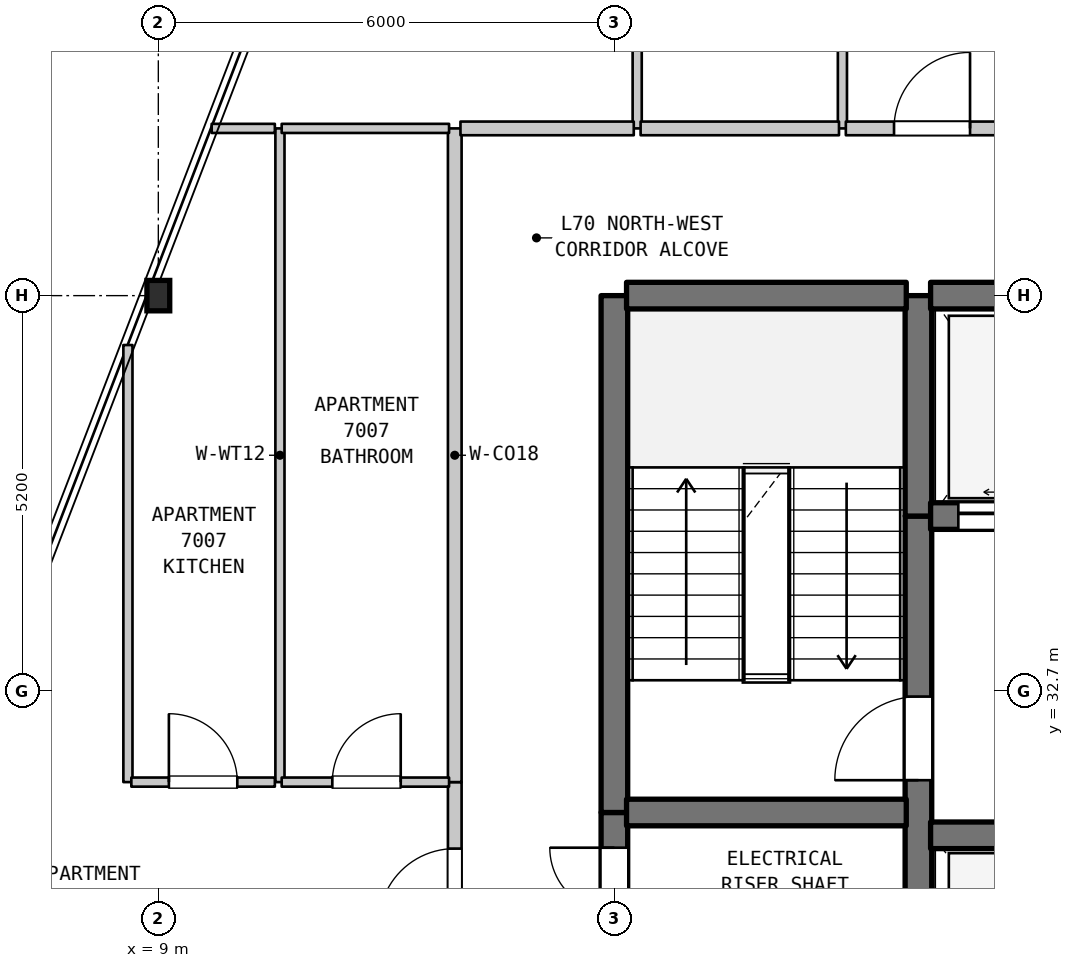
"""IFC4 building model, lengths in metres.
Left out: names, types, materials, properties, quantities, classifications, styles, units other than length and angle.
Written with IfcOpenShell. Run it as: python <this file> out.ifc"""

import sys

from ifc_helpers import new_model, si_unit, direction, frame, frame_2d, origin, origin_2d, place, context, subcontext, project, spatial, rectangle, i_section, extrude, element, fill, save


model = new_model("IFC4")
c1 = context("Model", 3, precision=1e-05, world=origin(), true_north=direction((0.0, 1.0)))
c2 = subcontext(c1, "Body", "Model", "MODEL_VIEW")
j1 = project(units=[si_unit("LENGTHUNIT", "METRE"), si_unit("PLANEANGLEUNIT", "RADIAN")], contexts=[c1])
p1 = place(None, origin())
s1 = spatial("IfcSite", under=j1, at=p1, CompositionType="ELEMENT")
p2 = place(p1, origin())
s2 = spatial("IfcBuilding", under=s1, at=p2, CompositionType="ELEMENT")
p3 = place(p2, frame((0.0, 0.0, 280.6)))
s3 = spatial("IfcBuildingStorey", under=s2, at=p3, CompositionType="ELEMENT", Elevation=280.6)
p4 = place(p3, frame((9.0, 37.9, 0.0), z_axis=(0.0, 0.0, 1.0), x_axis=(1.0, 0.0, 0.0)))
e1 = element("IfcColumn", 1, at=p4, inside=s3, PredefinedType="COLUMN", context=c2, shape_type="SweptSolid", body=[
    extrude(i_section(OverallWidth=0.3, OverallDepth=0.4, WebThickness=0.013, FlangeThickness=0.024, FilletRadius=0.027, at=origin_2d()), origin(), (0.0, 0.0, 1.0), 3.7),
])
p5 = place(p3, frame((8.6, 31.5, 0.0), z_axis=(0.0, 0.0, 1.0), x_axis=(0.0, 1.0, 0.0)))
e2 = element("IfcWall", 2, at=p5, inside=s3, PredefinedType="PARTITIONING", context=c2, shape_type="SweptSolid", body=[
    extrude(rectangle(XDim=5.75, YDim=0.12, at=frame_2d((2.875, 0.0))), origin(), (0.0, 0.0, 1.0), 3.39),
])
p6 = place(p3, frame((10.6, 31.5, 0.0), z_axis=(0.0, 0.0, 1.0), x_axis=(0.0, 1.0, 0.0)))
e3 = element("IfcWall", 3, at=p6, inside=s3, PredefinedType="PARTITIONING", context=c2, shape_type="SweptSolid", body=[
    extrude(rectangle(XDim=8.6, YDim=0.12, at=frame_2d((4.3, 0.0))), origin(), (0.0, 0.0, 1.0), 3.39),
])
p7 = place(p3, frame((12.9, 28.75, 0.0), z_axis=(0.0, 0.0, 1.0), x_axis=(0.0, 1.0, 0.0)))
e4 = element("IfcWall", 4, at=p7, inside=s3, PredefinedType="STANDARD", context=c2, shape_type="SweptSolid", body=[
    extrude(rectangle(XDim=2.75, YDim=0.18, at=frame_2d((1.375, 0.0))), origin(), (0.0, 0.0, 1.0), 3.39),
])
p8 = place(p7, frame((0.875, 0.0, 0.0)))
e5 = element("IfcOpeningElement", 5, at=p8, cuts=e4, PredefinedType="OPENING", context=c2, shape_type="SweptSolid", body=[
    extrude(rectangle(XDim=1.0, YDim=2.15, at=frame_2d((0.5, 1.075))), frame((0.0, 0.1, 0.0), z_axis=(0.0, -1.0, 0.0), x_axis=(1.0, 0.0, 0.0)), (0.0, 0.0, 1.0), 0.2),
])
p9 = place(p3, frame((12.9, 31.5, 0.0), z_axis=(0.0, 0.0, 1.0), x_axis=(0.0, 1.0, 0.0)))
e6 = element("IfcWall", 6, at=p9, inside=s3, PredefinedType="STANDARD", context=c2, shape_type="SweptSolid", body=[
    extrude(rectangle(XDim=8.6, YDim=0.18, at=frame_2d((4.3, 0.0))), origin(), (0.0, 0.0, 1.0), 3.39),
])
p10 = place(p3, frame((15.0, 29.5, 0.0), z_axis=(0.0, 0.0, 1.0), x_axis=(0.0, 1.0, 0.0)))
e7 = element("IfcWall", 7, at=p10, inside=s3, PredefinedType="SHEAR", context=c2, shape_type="SweptSolid", body=[
    extrude(rectangle(XDim=1.6, YDim=0.35, at=frame_2d((0.8, 0.0))), origin(), (0.0, 0.0, 1.0), 3.39),
])
p11 = place(p10, frame((0.287, 0.0, 0.0)))
e8 = element("IfcOpeningElement", 8, at=p11, cuts=e7, PredefinedType="OPENING", context=c2, shape_type="SweptSolid", body=[
    extrude(rectangle(XDim=0.85, YDim=2.1, at=frame_2d((0.425, 1.05))), frame((0.0, 0.185, 0.0), z_axis=(0.0, -1.0, 0.0), x_axis=(1.0, 0.0, 0.0)), (0.0, 0.0, 1.0), 0.37),
])
p12 = place(p3, frame((15.0, 31.1, 0.0), z_axis=(0.0, 0.0, 1.0), x_axis=(0.0, 1.0, 0.0)))
e9 = element("IfcWall", 9, at=p12, inside=s3, PredefinedType="SHEAR", context=c2, shape_type="SweptSolid", body=[
    extrude(rectangle(XDim=6.8, YDim=0.35, at=frame_2d((3.4, 0.0))), origin(), (0.0, 0.0, 1.0), 3.39),
])
p13 = place(p3, frame((15.3, 40.1, 0.0), z_axis=(0.0, 0.0, 1.0), x_axis=(0.0, 1.0, 0.0)))
e10 = element("IfcWall", 10, at=p13, inside=s3, PredefinedType="PARTITIONING", context=c2, shape_type="SweptSolid", body=[
    extrude(rectangle(XDim=3.2, YDim=0.12, at=frame_2d((1.6, 0.0))), origin(), (0.0, 0.0, 1.0), 3.39),
])
p14 = place(p3, frame((18.0, 40.1, 0.0), z_axis=(0.0, 0.0, 1.0), x_axis=(0.0, 1.0, 0.0)))
e11 = element("IfcWall", 11, at=p14, inside=s3, PredefinedType="PARTITIONING", context=c2, shape_type="SweptSolid", body=[
    extrude(rectangle(XDim=3.2, YDim=0.12, at=frame_2d((1.6, 0.0))), origin(), (0.0, 0.0, 1.0), 3.39),
])
p15 = place(p14, frame((1.15, 0.0, 0.0)))
e12 = element("IfcOpeningElement", 12, at=p15, cuts=e11, PredefinedType="OPENING", context=c2, shape_type="SweptSolid", body=[
    extrude(rectangle(XDim=0.9, YDim=2.15, at=frame_2d((0.45, 1.075))), frame((0.0, 0.07, 0.0), z_axis=(0.0, -1.0, 0.0), x_axis=(1.0, 0.0, 0.0)), (0.0, 0.0, 1.0), 0.14),
])
p16 = place(p3, frame((19.0, 29.5, 0.0), z_axis=(0.0, 0.0, 1.0), x_axis=(0.0, 1.0, 0.0)))
e13 = element("IfcWall", 13, at=p16, inside=s3, PredefinedType="SHEAR", context=c2, shape_type="SweptSolid", body=[
    extrude(rectangle(XDim=5.5, YDim=0.35, at=frame_2d((2.75, 0.0))), origin(), (0.0, 0.0, 1.0), 3.39),
])
p17 = place(p16, frame((2.025, 0.0, 0.0)))
e14 = element("IfcOpeningElement", 14, at=p17, cuts=e13, PredefinedType="OPENING", context=c2, shape_type="SweptSolid", body=[
    extrude(rectangle(XDim=1.1, YDim=2.15, at=frame_2d((0.55, 1.075))), frame((0.0, 0.185, 0.0), z_axis=(0.0, -1.0, 0.0), x_axis=(1.0, 0.0, 0.0)), (0.0, 0.0, 1.0), 0.37),
])
p18 = place(p3, frame((19.0, 35.0, 0.0), z_axis=(0.0, 0.0, 1.0), x_axis=(0.0, 1.0, 0.0)))
e15 = element("IfcWall", 15, at=p18, inside=s3, PredefinedType="SHEAR", context=c2, shape_type="SweptSolid", body=[
    extrude(rectangle(XDim=2.9, YDim=0.35, at=frame_2d((1.45, 0.0))), origin(), (0.0, 0.0, 1.0), 3.39),
])
p19 = place(p3, frame((19.16, 30.8, 0.0), z_axis=(0.0, 0.0, 1.0), x_axis=(1.0, 0.0, 0.0)))
e16 = element("IfcWall", 16, at=p19, inside=s3, PredefinedType="SHEAR", context=c2, shape_type="SweptSolid", body=[
    extrude(rectangle(XDim=4.48, YDim=0.35, at=frame_2d((2.24, 0.0))), origin(), (0.0, 0.0, 1.0), 3.39),
])
p20 = place(p3, frame((15.16, 31.1, 0.0), z_axis=(0.0, 0.0, 1.0), x_axis=(1.0, 0.0, 0.0)))
e17 = element("IfcWall", 17, at=p20, inside=s3, PredefinedType="SHEAR", context=c2, shape_type="SweptSolid", body=[
    extrude(rectangle(XDim=3.68, YDim=0.35, at=frame_2d((1.84, 0.0))), origin(), (0.0, 0.0, 1.0), 3.39),
])
p21 = place(p3, frame((8.645, 31.5, 0.0), z_axis=(0.0, 0.0, 1.0), x_axis=(1.0, 0.0, 0.0)))
e18 = element("IfcWall", 18, at=p21, inside=s3, PredefinedType="PARTITIONING", context=c2, shape_type="SweptSolid", body=[
    extrude(rectangle(XDim=1.888, YDim=0.12, at=frame_2d((0.944, 0.0))), origin(), (0.0, 0.0, 1.0), 3.39),
])
p22 = place(p21, frame((0.494, 0.0, 0.0)))
e19 = element("IfcOpeningElement", 19, at=p22, cuts=e18, PredefinedType="OPENING", context=c2, shape_type="SweptSolid", body=[
    extrude(rectangle(XDim=0.9, YDim=2.15, at=frame_2d((0.45, 1.075))), frame((0.0, 0.07, 0.0), z_axis=(0.0, -1.0, 0.0), x_axis=(1.0, 0.0, 0.0)), (0.0, 0.0, 1.0), 0.14),
])
p23 = place(p3, frame((10.623, 31.5, 0.0), z_axis=(0.0, 0.0, 1.0), x_axis=(1.0, 0.0, 0.0)))
e20 = element("IfcWall", 20, at=p23, inside=s3, PredefinedType="PARTITIONING", context=c2, shape_type="SweptSolid", body=[
    extrude(rectangle(XDim=2.202, YDim=0.12, at=frame_2d((1.101, 0.0))), origin(), (0.0, 0.0, 1.0), 3.39),
])
p24 = place(p23, frame((0.666, 0.0, 0.0)))
e21 = element("IfcOpeningElement", 21, at=p24, cuts=e20, PredefinedType="OPENING", context=c2, shape_type="SweptSolid", body=[
    extrude(rectangle(XDim=0.9, YDim=2.1, at=frame_2d((0.45, 1.05))), frame((0.0, 0.07, 0.0), z_axis=(0.0, -1.0, 0.0), x_axis=(1.0, 0.0, 0.0)), (0.0, 0.0, 1.0), 0.14),
])
p25 = place(p3, frame((19.16, 35.0, 0.0), z_axis=(0.0, 0.0, 1.0), x_axis=(1.0, 0.0, 0.0)))
e22 = element("IfcWall", 22, at=p25, inside=s3, PredefinedType="SHEAR", context=c2, shape_type="SweptSolid", body=[
    extrude(rectangle(XDim=4.48, YDim=0.35, at=frame_2d((2.24, 0.0))), origin(), (0.0, 0.0, 1.0), 3.39),
])
p26 = place(p25, frame((0.365, 0.0, 0.0)))
e23 = element("IfcOpeningElement", 23, at=p26, cuts=e22, PredefinedType="OPENING", context=c2, shape_type="SweptSolid", body=[
    extrude(rectangle(XDim=1.35, YDim=2.2, at=frame_2d((0.675, 1.1))), frame((0.0, 0.185, 0.0), z_axis=(0.0, -1.0, 0.0), x_axis=(1.0, 0.0, 0.0)), (0.0, 0.0, 1.0), 0.37),
])
p27 = place(p25, frame((2.765, 0.0, 0.0)))
e24 = element("IfcOpeningElement", 24, at=p27, cuts=e22, PredefinedType="OPENING", context=c2, shape_type="SweptSolid", body=[
    extrude(rectangle(XDim=1.35, YDim=2.2, at=frame_2d((0.675, 1.1))), frame((0.0, 0.185, 0.0), z_axis=(0.0, -1.0, 0.0), x_axis=(1.0, 0.0, 0.0)), (0.0, 0.0, 1.0), 0.37),
])
p28 = place(p3, frame((15.16, 37.9, 0.0), z_axis=(0.0, 0.0, 1.0), x_axis=(1.0, 0.0, 0.0)))
e25 = element("IfcWall", 25, at=p28, inside=s3, PredefinedType="SHEAR", context=c2, shape_type="SweptSolid", body=[
    extrude(rectangle(XDim=3.68, YDim=0.35, at=frame_2d((1.84, 0.0))), origin(), (0.0, 0.0, 1.0), 3.39),
])
p29 = place(p3, frame((19.16, 37.9, 0.0), z_axis=(0.0, 0.0, 1.0), x_axis=(1.0, 0.0, 0.0)))
e26 = element("IfcWall", 26, at=p29, inside=s3, PredefinedType="SHEAR", context=c2, shape_type="SweptSolid", body=[
    extrude(rectangle(XDim=4.48, YDim=0.35, at=frame_2d((2.24, 0.0))), origin(), (0.0, 0.0, 1.0), 3.39),
])
p30 = place(p3, frame((9.702, 40.1, 0.0), z_axis=(0.0, 0.0, 1.0), x_axis=(1.0, 0.0, 0.0)))
e27 = element("IfcWall", 27, at=p30, inside=s3, PredefinedType="PARTITIONING", context=c2, shape_type="SweptSolid", body=[
    extrude(rectangle(XDim=0.831, YDim=0.12, at=frame_2d((0.416, 0.0))), origin(), (0.0, 0.0, 1.0), 3.39),
])
p31 = place(p3, frame((10.623, 40.1, 0.0), z_axis=(0.0, 0.0, 1.0), x_axis=(1.0, 0.0, 0.0)))
e28 = element("IfcWall", 28, at=p31, inside=s3, PredefinedType="PARTITIONING", context=c2, shape_type="SweptSolid", body=[
    extrude(rectangle(XDim=2.202, YDim=0.12, at=frame_2d((1.101, 0.0))), origin(), (0.0, 0.0, 1.0), 3.39),
])
p32 = place(p3, frame((12.975, 40.1, 0.0), z_axis=(0.0, 0.0, 1.0), x_axis=(1.0, 0.0, 0.0)))
e29 = element("IfcWall", 29, at=p32, inside=s3, PredefinedType="STANDARD", context=c2, shape_type="SweptSolid", body=[
    extrude(rectangle(XDim=2.28, YDim=0.18, at=frame_2d((1.14, 0.0))), origin(), (0.0, 0.0, 1.0), 3.39),
])
p33 = place(p3, frame((15.345, 40.1, 0.0), z_axis=(0.0, 0.0, 1.0), x_axis=(1.0, 0.0, 0.0)))
e30 = element("IfcWall", 30, at=p33, inside=s3, PredefinedType="STANDARD", context=c2, shape_type="SweptSolid", body=[
    extrude(rectangle(XDim=2.61, YDim=0.18, at=frame_2d((1.305, 0.0))), origin(), (0.0, 0.0, 1.0), 3.39),
])
p34 = place(p3, frame((18.045, 40.1, 0.0), z_axis=(0.0, 0.0, 1.0), x_axis=(1.0, 0.0, 0.0)))
e31 = element("IfcWall", 31, at=p34, inside=s3, PredefinedType="STANDARD", context=c2, shape_type="SweptSolid", body=[
    extrude(rectangle(XDim=2.41, YDim=0.18, at=frame_2d((1.205, 0.0))), origin(), (0.0, 0.0, 1.0), 3.39),
])
p35 = place(p34, frame((0.634, 0.0, 0.0)))
e32 = element("IfcOpeningElement", 32, at=p35, cuts=e31, PredefinedType="OPENING", context=c2, shape_type="SweptSolid", body=[
    extrude(rectangle(XDim=1.0, YDim=2.15, at=frame_2d((0.5, 1.075))), frame((0.0, 0.1, 0.0), z_axis=(0.0, -1.0, 0.0), x_axis=(1.0, 0.0, 0.0)), (0.0, 0.0, 1.0), 0.2),
])
p36 = place(p8, origin())
e33 = element("IfcDoor", 33, at=p36, inside=s3, OperationType="SINGLE_SWING_LEFT", PredefinedType="DOOR", context=c2, shape_type="SweptSolid", body=[
    extrude(rectangle(XDim=1.0, YDim=2.15, at=frame_2d((0.5, 1.075))), frame((0.0, 0.025, 0.0), z_axis=(0.0, -1.0, 0.0), x_axis=(1.0, 0.0, 0.0)), (0.0, 0.0, 1.0), 0.05),
])
fill(e5, e33)
p37 = place(p11, origin())
e34 = element("IfcDoor", 34, at=p37, inside=s3, OperationType="SINGLE_SWING_RIGHT", PredefinedType="DOOR", context=c2, shape_type="SweptSolid", body=[
    extrude(rectangle(XDim=0.85, YDim=2.1, at=frame_2d((0.425, 1.05))), frame((0.0, 0.025, 0.0), z_axis=(0.0, -1.0, 0.0), x_axis=(1.0, 0.0, 0.0)), (0.0, 0.0, 1.0), 0.05),
])
fill(e8, e34)
p38 = place(p17, origin())
e35 = element("IfcDoor", 35, at=p38, inside=s3, OperationType="SINGLE_SWING_LEFT", PredefinedType="DOOR", context=c2, shape_type="SweptSolid", body=[
    extrude(rectangle(XDim=1.1, YDim=2.15, at=frame_2d((0.55, 1.075))), frame((0.0, 0.025, 0.0), z_axis=(0.0, -1.0, 0.0), x_axis=(1.0, 0.0, 0.0)), (0.0, 0.0, 1.0), 0.05),
])
fill(e14, e35)
p39 = place(p22, origin())
e36 = element("IfcDoor", 36, at=p39, inside=s3, OperationType="SINGLE_SWING_LEFT", PredefinedType="DOOR", context=c2, shape_type="SweptSolid", body=[
    extrude(rectangle(XDim=0.9, YDim=2.15, at=frame_2d((0.45, 1.075))), frame((0.0, 0.025, 0.0), z_axis=(0.0, -1.0, 0.0), x_axis=(1.0, 0.0, 0.0)), (0.0, 0.0, 1.0), 0.05),
])
fill(e19, e36)
p40 = place(p24, origin())
e37 = element("IfcDoor", 37, at=p40, inside=s3, OperationType="SINGLE_SWING_RIGHT", PredefinedType="DOOR", context=c2, shape_type="SweptSolid", body=[
    extrude(rectangle(XDim=0.9, YDim=2.1, at=frame_2d((0.45, 1.05))), frame((0.0, 0.025, 0.0), z_axis=(0.0, -1.0, 0.0), x_axis=(1.0, 0.0, 0.0)), (0.0, 0.0, 1.0), 0.05),
])
fill(e21, e37)
p41 = place(p26, origin())
e38 = element("IfcDoor", 38, at=p41, inside=s3, OperationType="DOUBLE_DOOR_SLIDING", PredefinedType="DOOR", context=c2, shape_type="SweptSolid", body=[
    extrude(rectangle(XDim=1.35, YDim=2.2, at=frame_2d((0.675, 1.1))), frame((0.0, 0.025, 0.0), z_axis=(0.0, -1.0, 0.0), x_axis=(1.0, 0.0, 0.0)), (0.0, 0.0, 1.0), 0.05),
])
fill(e23, e38)
p42 = place(p35, origin())
e39 = element("IfcDoor", 39, at=p42, inside=s3, OperationType="SINGLE_SWING_RIGHT", PredefinedType="DOOR", context=c2, shape_type="SweptSolid", body=[
    extrude(rectangle(XDim=1.0, YDim=2.15, at=frame_2d((0.5, 1.075))), frame((0.0, 0.025, 0.0), z_axis=(0.0, -1.0, 0.0), x_axis=(1.0, 0.0, 0.0)), (0.0, 0.0, 1.0), 0.05),
])
fill(e32, e39)
save(model, sys.argv[1])
